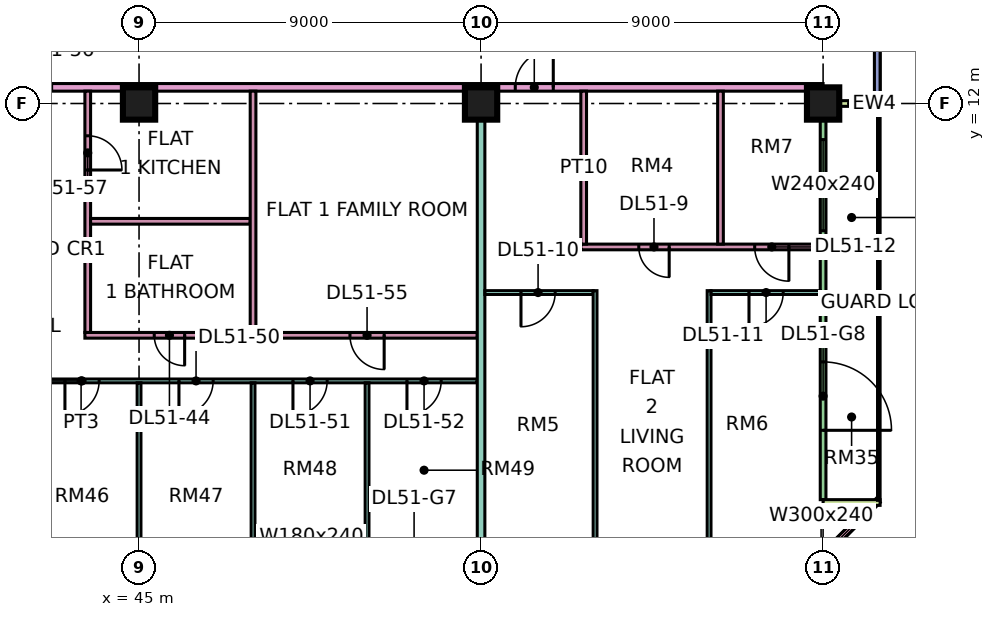
"""IFC4 building model, lengths in metres.
Left out: names, types, materials, properties, quantities, classifications, styles, units other than length and angle.
Written with IfcOpenShell. Run it as: python <this file> out.ifc"""

import sys

from ifc_helpers import new_model, si_unit, direction, frame, frame_2d, origin, origin_2d, place, context, subcontext, project, spatial, rectangle, extrude, element, fill, save


model = new_model("IFC4")
c1 = context("Model", 3, precision=1e-05, world=origin(), true_north=direction((0.0, 1.0)))
c2 = subcontext(c1, "Body", "Model", "MODEL_VIEW")
j1 = project(units=[si_unit("LENGTHUNIT", "METRE"), si_unit("PLANEANGLEUNIT", "RADIAN")], contexts=[c1])
p1 = place(None, origin())
s1 = spatial("IfcSite", under=j1, at=p1, CompositionType="ELEMENT")
p2 = place(p1, origin())
s2 = spatial("IfcBuilding", under=s1, at=p2, CompositionType="ELEMENT")
p3 = place(p2, frame((0.0, 0.0, 219.15)))
s3 = spatial("IfcBuildingStorey", under=s2, at=p3, CompositionType="ELEMENT", Elevation=219.15)
for number, where, z_axis, x_axis in (
    (1, (45.0, 12.0, 0.0), (0.0, 0.0, 1.0), (1.0, 0.0, 0.0)),
    (2, (54.0, 12.0, 0.0), (0.0, 0.0, 1.0), (1.0, 0.0, 0.0)),
    (3, (63.0, 12.0, 0.0), (0.0, 0.0, 1.0), (1.0, 0.0, 0.0)),
):
    element("IfcColumn", number, at=place(p3, frame(where, z_axis=z_axis, x_axis=x_axis)), inside=s3, PredefinedType="COLUMN", context=c2, shape_type="SweptSolid", body=[
        extrude(rectangle(XDim=0.85, YDim=0.85, at=origin_2d()), origin(), (0.0, 0.0, 1.0), 3.75),
    ])
p4 = place(p3, frame((61.447, -1.447, 0.0), z_axis=(0.0, 0.0, 1.0), x_axis=(0.707106781187, 0.707106781187, 0.0)))
e4 = element("IfcWall", 4, at=p4, inside=s3, PredefinedType="SOLIDWALL", context=c2, shape_type="SweptSolid", body=[
    extrude(rectangle(XDim=4.243, YDim=0.15, at=frame_2d((2.121, 0.0))), origin(), (0.0, 0.0, 1.0), 3.35),
])
p5 = place(p4, frame((0.621, 0.0, 0.45)))
e5 = element("IfcOpeningElement", 5, at=p5, cuts=e4, PredefinedType="OPENING", context=c2, shape_type="SweptSolid", body=[
    extrude(rectangle(XDim=3.0, YDim=2.4, at=frame_2d((1.5, 1.2))), frame((0.0, 0.085, 0.0), z_axis=(0.0, -1.0, 0.0), x_axis=(1.0, 0.0, 0.0)), (0.0, 0.0, 1.0), 0.17),
])
p6 = place(p3, frame((63.0, 1.575, 0.0), z_axis=(0.0, 0.0, 1.0), x_axis=(0.0, 1.0, 0.0)))
e6 = element("IfcWall", 6, at=p6, inside=s3, PredefinedType="SOLIDWALL", context=c2, shape_type="SweptSolid", body=[
    extrude(rectangle(XDim=10.35, YDim=0.15, at=frame_2d((5.175, 0.0))), origin(), (0.0, 0.0, 1.0), 3.35),
])
p7 = place(p6, frame((1.825, 0.0, 0.0)))
e7 = element("IfcOpeningElement", 7, at=p7, cuts=e6, PredefinedType="OPENING", context=c2, shape_type="SweptSolid", body=[
    extrude(rectangle(XDim=1.8, YDim=2.4, at=frame_2d((0.9, 1.2))), frame((0.0, 0.085, 0.0), z_axis=(0.0, -1.0, 0.0), x_axis=(1.0, 0.0, 0.0)), (0.0, 0.0, 1.0), 0.17),
])
p8 = place(p6, frame((7.075, 0.0, 0.45)))
e8 = element("IfcOpeningElement", 8, at=p8, cuts=e6, PredefinedType="OPENING", context=c2, shape_type="SweptSolid", body=[
    extrude(rectangle(XDim=2.4, YDim=2.4, at=frame_2d((1.2, 1.2))), frame((0.0, 0.085, 0.0), z_axis=(0.0, -1.0, 0.0), x_axis=(1.0, 0.0, 0.0)), (0.0, 0.0, 1.0), 0.17),
])
for number, where, z_axis, x_axis in (
    (9, (64.5, 1.5, 0.0), (0.0, 0.0, 1.0), (-1.0, 0.0, 0.0)),
    (10, (64.5, 12.0, 0.0), (0.0, 0.0, 1.0), (-1.0, 0.0, 0.0)),
):
    element("IfcWall", number, at=place(p3, frame(where, z_axis=z_axis, x_axis=x_axis)), inside=s3, PredefinedType="SOLIDWALL", context=c2, shape_type="SweptSolid", body=[
        extrude(rectangle(XDim=1.5, YDim=0.15, at=frame_2d((0.75, 0.0))), origin(), (0.0, 0.0, 1.0), 3.35),
    ])
p9 = place(p3, frame((64.425, 12.075, 0.0), z_axis=(0.0, 0.0, 1.0), x_axis=(0.0, 1.0, 0.0)))
e11 = element("IfcWall", 11, at=p9, inside=s3, PredefinedType="SOLIDWALL", context=c2, shape_type="SweptSolid", body=[
    extrude(rectangle(XDim=10.425, YDim=0.15, at=frame_2d((5.212, 0.0))), origin(), (0.0, 0.0, 1.0), 3.35),
])
p10 = place(p9, frame((4.275, 0.0, 0.45)))
e12 = element("IfcOpeningElement", 12, at=p10, cuts=e11, PredefinedType="OPENING", context=c2, shape_type="SweptSolid", body=[
    extrude(rectangle(XDim=3.0, YDim=2.4, at=frame_2d((1.5, 1.2))), frame((0.0, 0.085, 0.0), z_axis=(0.0, -1.0, 0.0), x_axis=(1.0, 0.0, 0.0)), (0.0, 0.0, 1.0), 0.17),
])
p11 = place(p9, frame((8.625, 0.0, 0.45)))
e13 = element("IfcOpeningElement", 13, at=p11, cuts=e11, PredefinedType="OPENING", context=c2, shape_type="SweptSolid", body=[
    extrude(rectangle(XDim=1.2, YDim=2.4, at=frame_2d((0.6, 1.2))), frame((0.0, 0.085, 0.0), z_axis=(0.0, -1.0, 0.0), x_axis=(1.0, 0.0, 0.0)), (0.0, 0.0, 1.0), 0.17),
])
p12 = place(p3, frame((33.05, 4.7, 0.0), z_axis=(0.0, 0.0, 1.0), x_axis=(1.0, 0.0, 0.0)))
e14 = element("IfcWall", 14, at=p12, inside=s3, PredefinedType="PARTITIONING", context=c2, shape_type="SweptSolid", body=[
    extrude(rectangle(XDim=20.85, YDim=0.1, at=frame_2d((10.425, 0.0))), origin(), (0.0, 0.0, 1.0), 3.35),
])
p13 = place(p12, frame((10.0, 0.0, 0.0)))
e15 = element("IfcOpeningElement", 15, at=p13, cuts=e14, PredefinedType="OPENING", context=c2, shape_type="SweptSolid", body=[
    extrude(rectangle(XDim=0.9, YDim=2.1, at=frame_2d((0.45, 1.05))), frame((0.0, 0.06, 0.0), z_axis=(0.0, -1.0, 0.0), x_axis=(1.0, 0.0, 0.0)), (0.0, 0.0, 1.0), 0.12),
])
p14 = place(p12, frame((13.0, 0.0, 0.0)))
e16 = element("IfcOpeningElement", 16, at=p14, cuts=e14, PredefinedType="OPENING", context=c2, shape_type="SweptSolid", body=[
    extrude(rectangle(XDim=0.9, YDim=2.1, at=frame_2d((0.45, 1.05))), frame((0.0, 0.06, 0.0), z_axis=(0.0, -1.0, 0.0), x_axis=(1.0, 0.0, 0.0)), (0.0, 0.0, 1.0), 0.12),
])
p15 = place(p12, frame((16.0, 0.0, 0.0)))
e17 = element("IfcOpeningElement", 17, at=p15, cuts=e14, PredefinedType="OPENING", context=c2, shape_type="SweptSolid", body=[
    extrude(rectangle(XDim=0.9, YDim=2.1, at=frame_2d((0.45, 1.05))), frame((0.0, 0.06, 0.0), z_axis=(0.0, -1.0, 0.0), x_axis=(1.0, 0.0, 0.0)), (0.0, 0.0, 1.0), 0.12),
])
p16 = place(p12, frame((19.0, 0.0, 0.0)))
e18 = element("IfcOpeningElement", 18, at=p16, cuts=e14, PredefinedType="OPENING", context=c2, shape_type="SweptSolid", body=[
    extrude(rectangle(XDim=0.9, YDim=2.1, at=frame_2d((0.45, 1.05))), frame((0.0, 0.06, 0.0), z_axis=(0.0, -1.0, 0.0), x_axis=(1.0, 0.0, 0.0)), (0.0, 0.0, 1.0), 0.12),
])
p17 = place(p12, frame((4.0, 0.0, 0.0)))
e19 = element("IfcOpeningElement", 19, at=p17, cuts=e14, PredefinedType="OPENING", context=c2, shape_type="SweptSolid", body=[
    extrude(rectangle(XDim=0.9, YDim=2.1, at=frame_2d((0.45, 1.05))), frame((0.0, 0.06, 0.0), z_axis=(0.0, -1.0, 0.0), x_axis=(1.0, 0.0, 0.0)), (0.0, 0.0, 1.0), 0.12),
])
p18 = place(p3, frame((40.65, 12.425, 0.0), z_axis=(0.0, 0.0, 1.0), x_axis=(1.0, 0.0, 0.0)))
e20 = element("IfcWall", 20, at=p18, inside=s3, PredefinedType="PARTITIONING", context=c2, shape_type="SweptSolid", body=[
    extrude(rectangle(XDim=22.35, YDim=0.2, at=frame_2d((11.175, 0.0))), origin(), (0.0, 0.0, 1.0), 3.35),
])
p19 = place(p18, frame((14.25, 0.0, 0.0)))
e21 = element("IfcOpeningElement", 21, at=p19, cuts=e20, PredefinedType="OPENING", context=c2, shape_type="SweptSolid", body=[
    extrude(rectangle(XDim=1.0, YDim=2.1, at=frame_2d((0.5, 1.05))), frame((0.0, 0.11, 0.0), z_axis=(0.0, -1.0, 0.0), x_axis=(1.0, 0.0, 0.0)), (0.0, 0.0, 1.0), 0.22),
])
p20 = place(p18, frame((1.05, 0.0, 0.0)))
e22 = element("IfcOpeningElement", 22, at=p20, cuts=e20, PredefinedType="OPENING", context=c2, shape_type="SweptSolid", body=[
    extrude(rectangle(XDim=1.0, YDim=2.1, at=frame_2d((0.5, 1.05))), frame((0.0, 0.11, 0.0), z_axis=(0.0, -1.0, 0.0), x_axis=(1.0, 0.0, 0.0)), (0.0, 0.0, 1.0), 0.22),
])
p21 = place(p3, frame((43.575, 5.9, 0.0), z_axis=(0.0, 0.0, 1.0), x_axis=(1.0, 0.0, 0.0)))
e23 = element("IfcWall", 23, at=p21, inside=s3, PredefinedType="PARTITIONING", context=c2, shape_type="SweptSolid", body=[
    extrude(rectangle(XDim=10.325, YDim=0.15, at=frame_2d((5.163, 0.0))), origin(), (0.0, 0.0, 1.0), 3.35),
])
p22 = place(p21, frame((1.825, 0.0, 0.0)))
e24 = element("IfcOpeningElement", 24, at=p22, cuts=e23, PredefinedType="OPENING", context=c2, shape_type="SweptSolid", body=[
    extrude(rectangle(XDim=0.8, YDim=2.1, at=frame_2d((0.4, 1.05))), frame((0.0, 0.085, 0.0), z_axis=(0.0, -1.0, 0.0), x_axis=(1.0, 0.0, 0.0)), (0.0, 0.0, 1.0), 0.17),
])
p23 = place(p21, frame((6.975, 0.0, 0.0)))
e25 = element("IfcOpeningElement", 25, at=p23, cuts=e23, PredefinedType="OPENING", context=c2, shape_type="SweptSolid", body=[
    extrude(rectangle(XDim=0.9, YDim=2.1, at=frame_2d((0.45, 1.05))), frame((0.0, 0.085, 0.0), z_axis=(0.0, -1.0, 0.0), x_axis=(1.0, 0.0, 0.0)), (0.0, 0.0, 1.0), 0.17),
])
p24 = place(p3, frame((43.65, 5.975, 0.0), z_axis=(0.0, 0.0, 1.0), x_axis=(0.0, 1.0, 0.0)))
e26 = element("IfcWall", 26, at=p24, inside=s3, PredefinedType="PARTITIONING", context=c2, shape_type="SweptSolid", body=[
    extrude(rectangle(XDim=6.35, YDim=0.15, at=frame_2d((3.175, 0.0))), origin(), (0.0, 0.0, 1.0), 3.35),
])
p25 = place(p24, frame((4.275, 0.0, 0.0)))
e27 = element("IfcOpeningElement", 27, at=p25, cuts=e26, PredefinedType="OPENING", context=c2, shape_type="SweptSolid", body=[
    extrude(rectangle(XDim=0.9, YDim=2.1, at=frame_2d((0.45, 1.05))), frame((0.0, 0.085, 0.0), z_axis=(0.0, -1.0, 0.0), x_axis=(1.0, 0.0, 0.0)), (0.0, 0.0, 1.0), 0.17),
])
p26 = place(p3, frame((43.725, 8.9, 0.0), z_axis=(0.0, 0.0, 1.0), x_axis=(1.0, 0.0, 0.0)))
e28 = element("IfcWall", 28, at=p26, inside=s3, PredefinedType="PARTITIONING", context=c2, shape_type="SweptSolid", body=[
    extrude(rectangle(XDim=4.2, YDim=0.15, at=frame_2d((2.1, 0.0))), origin(), (0.0, 0.0, 1.0), 3.35),
])
p27 = place(p3, frame((45.0, -1.351, 0.0), z_axis=(0.0, 0.0, 1.0), x_axis=(0.0, 1.0, 0.0)))
e29 = element("IfcWall", 29, at=p27, inside=s3, PredefinedType="PARTITIONING", context=c2, shape_type="SweptSolid", body=[
    extrude(rectangle(XDim=6.001, YDim=0.1, at=frame_2d((3.0, 0.0))), origin(), (0.0, 0.0, 1.0), 3.35),
])
p28 = place(p3, frame((48.0, 0.0, 0.0), z_axis=(0.0, 0.0, 1.0), x_axis=(0.0, 1.0, 0.0)))
e30 = element("IfcWall", 30, at=p28, inside=s3, PredefinedType="PARTITIONING", context=c2, shape_type="SweptSolid", body=[
    extrude(rectangle(XDim=4.65, YDim=0.1, at=frame_2d((2.325, 0.0))), origin(), (0.0, 0.0, 1.0), 3.35),
])
p29 = place(p3, frame((48.0, 5.975, 0.0), z_axis=(0.0, 0.0, 1.0), x_axis=(0.0, 1.0, 0.0)))
e31 = element("IfcWall", 31, at=p29, inside=s3, PredefinedType="PARTITIONING", context=c2, shape_type="SweptSolid", body=[
    extrude(rectangle(XDim=6.35, YDim=0.15, at=frame_2d((3.175, 0.0))), origin(), (0.0, 0.0, 1.0), 3.35),
])
p30 = place(p3, frame((51.0, 0.074, 0.0), z_axis=(0.0, 0.0, 1.0), x_axis=(0.0, 1.0, 0.0)))
e32 = element("IfcWall", 32, at=p30, inside=s3, PredefinedType="PARTITIONING", context=c2, shape_type="SweptSolid", body=[
    extrude(rectangle(XDim=4.576, YDim=0.1, at=frame_2d((2.288, 0.0))), origin(), (0.0, 0.0, 1.0), 3.35),
])
p31 = place(p3, frame((54.0, 0.074, 0.0), z_axis=(0.0, 0.0, 1.0), x_axis=(0.0, 1.0, 0.0)))
e33 = element("IfcWall", 33, at=p31, inside=s3, PredefinedType="PARTITIONING", context=c2, shape_type="SweptSolid", body=[
    extrude(rectangle(XDim=12.251, YDim=0.2, at=frame_2d((6.125, 0.0))), origin(), (0.0, 0.0, 1.0), 3.35),
])
p32 = place(p3, frame((54.1, 7.025, 0.0), z_axis=(0.0, 0.0, 1.0), x_axis=(1.0, 0.0, 0.0)))
e34 = element("IfcWall", 34, at=p32, inside=s3, PredefinedType="PARTITIONING", context=c2, shape_type="SweptSolid", body=[
    extrude(rectangle(XDim=2.85, YDim=0.1, at=frame_2d((1.425, 0.0))), origin(), (0.0, 0.0, 1.0), 3.35),
])
p33 = place(p32, frame((0.95, 0.0, 0.0)))
e35 = element("IfcOpeningElement", 35, at=p33, cuts=e34, PredefinedType="OPENING", context=c2, shape_type="SweptSolid", body=[
    extrude(rectangle(XDim=0.9, YDim=2.1, at=frame_2d((0.45, 1.05))), frame((0.0, 0.06, 0.0), z_axis=(0.0, -1.0, 0.0), x_axis=(1.0, 0.0, 0.0)), (0.0, 0.0, 1.0), 0.12),
])
p34 = place(p3, frame((56.625, 8.225, 0.0), z_axis=(0.0, 0.0, 1.0), x_axis=(1.0, 0.0, 0.0)))
e36 = element("IfcWall", 36, at=p34, inside=s3, PredefinedType="PARTITIONING", context=c2, shape_type="SweptSolid", body=[
    extrude(rectangle(XDim=6.301, YDim=0.15, at=frame_2d((3.15, 0.0))), origin(), (0.0, 0.0, 1.0), 3.35),
])
p35 = place(p34, frame((1.525, 0.0, 0.0)))
e37 = element("IfcOpeningElement", 37, at=p35, cuts=e36, PredefinedType="OPENING", context=c2, shape_type="SweptSolid", body=[
    extrude(rectangle(XDim=0.8, YDim=2.1, at=frame_2d((0.4, 1.05))), frame((0.0, 0.085, 0.0), z_axis=(0.0, -1.0, 0.0), x_axis=(1.0, 0.0, 0.0)), (0.0, 0.0, 1.0), 0.17),
])
p36 = place(p34, frame((4.575, 0.0, 0.0)))
e38 = element("IfcOpeningElement", 38, at=p36, cuts=e36, PredefinedType="OPENING", context=c2, shape_type="SweptSolid", body=[
    extrude(rectangle(XDim=0.9, YDim=2.1, at=frame_2d((0.45, 1.05))), frame((0.0, 0.085, 0.0), z_axis=(0.0, -1.0, 0.0), x_axis=(1.0, 0.0, 0.0)), (0.0, 0.0, 1.0), 0.17),
])
p37 = place(p3, frame((56.7, 8.3, 0.0), z_axis=(0.0, 0.0, 1.0), x_axis=(0.0, 1.0, 0.0)))
e39 = element("IfcWall", 39, at=p37, inside=s3, PredefinedType="PARTITIONING", context=c2, shape_type="SweptSolid", body=[
    extrude(rectangle(XDim=4.025, YDim=0.15, at=frame_2d((2.012, 0.0))), origin(), (0.0, 0.0, 1.0), 3.35),
])
for number, where, z_axis, x_axis in (
    (40, (57.0, 0.074, 0.0), (0.0, 0.0, 1.0), (0.0, 1.0, 0.0)),
    (41, (60.0, 0.074, 0.0), (0.0, 0.0, 1.0), (0.0, 1.0, 0.0)),
):
    element("IfcWall", number, at=place(p3, frame(where, z_axis=z_axis, x_axis=x_axis)), inside=s3, PredefinedType="PARTITIONING", context=c2, shape_type="SweptSolid", body=[
        extrude(rectangle(XDim=7.001, YDim=0.1, at=frame_2d((3.5, 0.0))), origin(), (0.0, 0.0, 1.0), 3.35),
    ])
p38 = place(p3, frame((60.05, 7.025, 0.0), z_axis=(0.0, 0.0, 1.0), x_axis=(1.0, 0.0, 0.0)))
e42 = element("IfcWall", 42, at=p38, inside=s3, PredefinedType="PARTITIONING", context=c2, shape_type="SweptSolid", body=[
    extrude(rectangle(XDim=2.876, YDim=0.1, at=frame_2d((1.438, 0.0))), origin(), (0.0, 0.0, 1.0), 3.35),
])
p39 = place(p38, frame((1.0, 0.0, 0.0)))
e43 = element("IfcOpeningElement", 43, at=p39, cuts=e42, PredefinedType="OPENING", context=c2, shape_type="SweptSolid", body=[
    extrude(rectangle(XDim=0.9, YDim=2.1, at=frame_2d((0.45, 1.05))), frame((0.0, 0.06, 0.0), z_axis=(0.0, -1.0, 0.0), x_axis=(1.0, 0.0, 0.0)), (0.0, 0.0, 1.0), 0.12),
])
p40 = place(p3, frame((60.3, 8.3, 0.0), z_axis=(0.0, 0.0, 1.0), x_axis=(0.0, 1.0, 0.0)))
e44 = element("IfcWall", 44, at=p40, inside=s3, PredefinedType="PARTITIONING", context=c2, shape_type="SweptSolid", body=[
    extrude(rectangle(XDim=4.025, YDim=0.15, at=frame_2d((2.012, 0.0))), origin(), (0.0, 0.0, 1.0), 3.35),
])
p41 = place(p5, origin())
e45 = element("IfcWindow", 45, at=p41, inside=s3, PartitioningType="SINGLE_PANEL", PredefinedType="WINDOW", context=c2, shape_type="SweptSolid", body=[
    extrude(rectangle(XDim=3.0, YDim=2.4, at=frame_2d((1.5, 1.2))), frame((0.0, 0.03, 0.0), z_axis=(0.0, -1.0, 0.0), x_axis=(1.0, 0.0, 0.0)), (0.0, 0.0, 1.0), 0.06),
])
fill(e5, e45)
p42 = place(p7, frame((1.8, 0.0, 0.0), z_axis=(0.0, 0.0, 1.0), x_axis=(-1.0, 0.0, 0.0)))
e46 = element("IfcDoor", 46, at=p42, inside=s3, OperationType="DOUBLE_DOOR_SINGLE_SWING", PredefinedType="DOOR", context=c2, shape_type="SweptSolid", body=[
    extrude(rectangle(XDim=1.8, YDim=2.4, at=frame_2d((0.9, 1.2))), frame((0.0, 0.025, 0.0), z_axis=(0.0, -1.0, 0.0), x_axis=(1.0, 0.0, 0.0)), (0.0, 0.0, 1.0), 0.05),
])
fill(e7, e46)
p43 = place(p8, origin())
e47 = element("IfcWindow", 47, at=p43, inside=s3, PartitioningType="SINGLE_PANEL", PredefinedType="WINDOW", context=c2, shape_type="SweptSolid", body=[
    extrude(rectangle(XDim=2.4, YDim=2.4, at=frame_2d((1.2, 1.2))), frame((0.0, 0.03, 0.0), z_axis=(0.0, -1.0, 0.0), x_axis=(1.0, 0.0, 0.0)), (0.0, 0.0, 1.0), 0.06),
])
fill(e8, e47)
p44 = place(p35, origin())
e48 = element("IfcDoor", 48, at=p44, inside=s3, OperationType="SINGLE_SWING_RIGHT", PredefinedType="DOOR", context=c2, shape_type="SweptSolid", body=[
    extrude(rectangle(XDim=0.8, YDim=2.1, at=frame_2d((0.4, 1.05))), frame((0.0, 0.025, 0.0), z_axis=(0.0, -1.0, 0.0), x_axis=(1.0, 0.0, 0.0)), (0.0, 0.0, 1.0), 0.05),
])
fill(e37, e48)
p45 = place(p33, frame((0.9, 0.0, 0.0), z_axis=(0.0, 0.0, 1.0), x_axis=(-1.0, 0.0, 0.0)))
e49 = element("IfcDoor", 49, at=p45, inside=s3, OperationType="SINGLE_SWING_LEFT", PredefinedType="DOOR", context=c2, shape_type="SweptSolid", body=[
    extrude(rectangle(XDim=0.9, YDim=2.1, at=frame_2d((0.45, 1.05))), frame((0.0, 0.025, 0.0), z_axis=(0.0, -1.0, 0.0), x_axis=(1.0, 0.0, 0.0)), (0.0, 0.0, 1.0), 0.05),
])
fill(e35, e49)
p46 = place(p39, frame((0.9, 0.0, 0.0), z_axis=(0.0, 0.0, 1.0), x_axis=(-1.0, 0.0, 0.0)))
e50 = element("IfcDoor", 50, at=p46, inside=s3, OperationType="SINGLE_SWING_LEFT", PredefinedType="DOOR", context=c2, shape_type="SweptSolid", body=[
    extrude(rectangle(XDim=0.9, YDim=2.1, at=frame_2d((0.45, 1.05))), frame((0.0, 0.025, 0.0), z_axis=(0.0, -1.0, 0.0), x_axis=(1.0, 0.0, 0.0)), (0.0, 0.0, 1.0), 0.05),
])
fill(e43, e50)
p47 = place(p36, origin())
e51 = element("IfcDoor", 51, at=p47, inside=s3, OperationType="SINGLE_SWING_RIGHT", PredefinedType="DOOR", context=c2, shape_type="SweptSolid", body=[
    extrude(rectangle(XDim=0.9, YDim=2.1, at=frame_2d((0.45, 1.05))), frame((0.0, 0.025, 0.0), z_axis=(0.0, -1.0, 0.0), x_axis=(1.0, 0.0, 0.0)), (0.0, 0.0, 1.0), 0.05),
])
fill(e38, e51)
p48 = place(p19, frame((1.0, 0.0, 0.0), z_axis=(0.0, 0.0, 1.0), x_axis=(-1.0, 0.0, 0.0)))
e52 = element("IfcDoor", 52, at=p48, inside=s3, OperationType="SINGLE_SWING_RIGHT", PredefinedType="DOOR", context=c2, shape_type="SweptSolid", body=[
    extrude(rectangle(XDim=1.0, YDim=2.1, at=frame_2d((0.5, 1.05))), frame((0.0, 0.025, 0.0), z_axis=(0.0, -1.0, 0.0), x_axis=(1.0, 0.0, 0.0)), (0.0, 0.0, 1.0), 0.05),
])
fill(e21, e52)
p49 = place(p22, origin())
e53 = element("IfcDoor", 53, at=p49, inside=s3, OperationType="SINGLE_SWING_RIGHT", PredefinedType="DOOR", context=c2, shape_type="SweptSolid", body=[
    extrude(rectangle(XDim=0.8, YDim=2.1, at=frame_2d((0.4, 1.05))), frame((0.0, 0.025, 0.0), z_axis=(0.0, -1.0, 0.0), x_axis=(1.0, 0.0, 0.0)), (0.0, 0.0, 1.0), 0.05),
])
fill(e24, e53)
p50 = place(p13, frame((0.9, 0.0, 0.0), z_axis=(0.0, 0.0, 1.0), x_axis=(-1.0, 0.0, 0.0)))
e54 = element("IfcDoor", 54, at=p50, inside=s3, OperationType="SINGLE_SWING_LEFT", PredefinedType="DOOR", context=c2, shape_type="SweptSolid", body=[
    extrude(rectangle(XDim=0.9, YDim=2.1, at=frame_2d((0.45, 1.05))), frame((0.0, 0.025, 0.0), z_axis=(0.0, -1.0, 0.0), x_axis=(1.0, 0.0, 0.0)), (0.0, 0.0, 1.0), 0.05),
])
fill(e15, e54)
p51 = place(p14, frame((0.9, 0.0, 0.0), z_axis=(0.0, 0.0, 1.0), x_axis=(-1.0, 0.0, 0.0)))
e55 = element("IfcDoor", 55, at=p51, inside=s3, OperationType="SINGLE_SWING_LEFT", PredefinedType="DOOR", context=c2, shape_type="SweptSolid", body=[
    extrude(rectangle(XDim=0.9, YDim=2.1, at=frame_2d((0.45, 1.05))), frame((0.0, 0.025, 0.0), z_axis=(0.0, -1.0, 0.0), x_axis=(1.0, 0.0, 0.0)), (0.0, 0.0, 1.0), 0.05),
])
fill(e16, e55)
p52 = place(p15, frame((0.9, 0.0, 0.0), z_axis=(0.0, 0.0, 1.0), x_axis=(-1.0, 0.0, 0.0)))
e56 = element("IfcDoor", 56, at=p52, inside=s3, OperationType="SINGLE_SWING_LEFT", PredefinedType="DOOR", context=c2, shape_type="SweptSolid", body=[
    extrude(rectangle(XDim=0.9, YDim=2.1, at=frame_2d((0.45, 1.05))), frame((0.0, 0.025, 0.0), z_axis=(0.0, -1.0, 0.0), x_axis=(1.0, 0.0, 0.0)), (0.0, 0.0, 1.0), 0.05),
])
fill(e17, e56)
p53 = place(p16, frame((0.9, 0.0, 0.0), z_axis=(0.0, 0.0, 1.0), x_axis=(-1.0, 0.0, 0.0)))
e57 = element("IfcDoor", 57, at=p53, inside=s3, OperationType="SINGLE_SWING_LEFT", PredefinedType="DOOR", context=c2, shape_type="SweptSolid", body=[
    extrude(rectangle(XDim=0.9, YDim=2.1, at=frame_2d((0.45, 1.05))), frame((0.0, 0.025, 0.0), z_axis=(0.0, -1.0, 0.0), x_axis=(1.0, 0.0, 0.0)), (0.0, 0.0, 1.0), 0.05),
])
fill(e18, e57)
p54 = place(p23, origin())
e58 = element("IfcDoor", 58, at=p54, inside=s3, OperationType="SINGLE_SWING_RIGHT", PredefinedType="DOOR", context=c2, shape_type="SweptSolid", body=[
    extrude(rectangle(XDim=0.9, YDim=2.1, at=frame_2d((0.45, 1.05))), frame((0.0, 0.025, 0.0), z_axis=(0.0, -1.0, 0.0), x_axis=(1.0, 0.0, 0.0)), (0.0, 0.0, 1.0), 0.05),
])
fill(e25, e58)
p55 = place(p25, frame((0.9, 0.0, 0.0), z_axis=(0.0, 0.0, 1.0), x_axis=(-1.0, 0.0, 0.0)))
e59 = element("IfcDoor", 59, at=p55, inside=s3, OperationType="SINGLE_SWING_LEFT", PredefinedType="DOOR", context=c2, shape_type="SweptSolid", body=[
    extrude(rectangle(XDim=0.9, YDim=2.1, at=frame_2d((0.45, 1.05))), frame((0.0, 0.025, 0.0), z_axis=(0.0, -1.0, 0.0), x_axis=(1.0, 0.0, 0.0)), (0.0, 0.0, 1.0), 0.05),
])
fill(e27, e59)
save(model, sys.argv[1])
